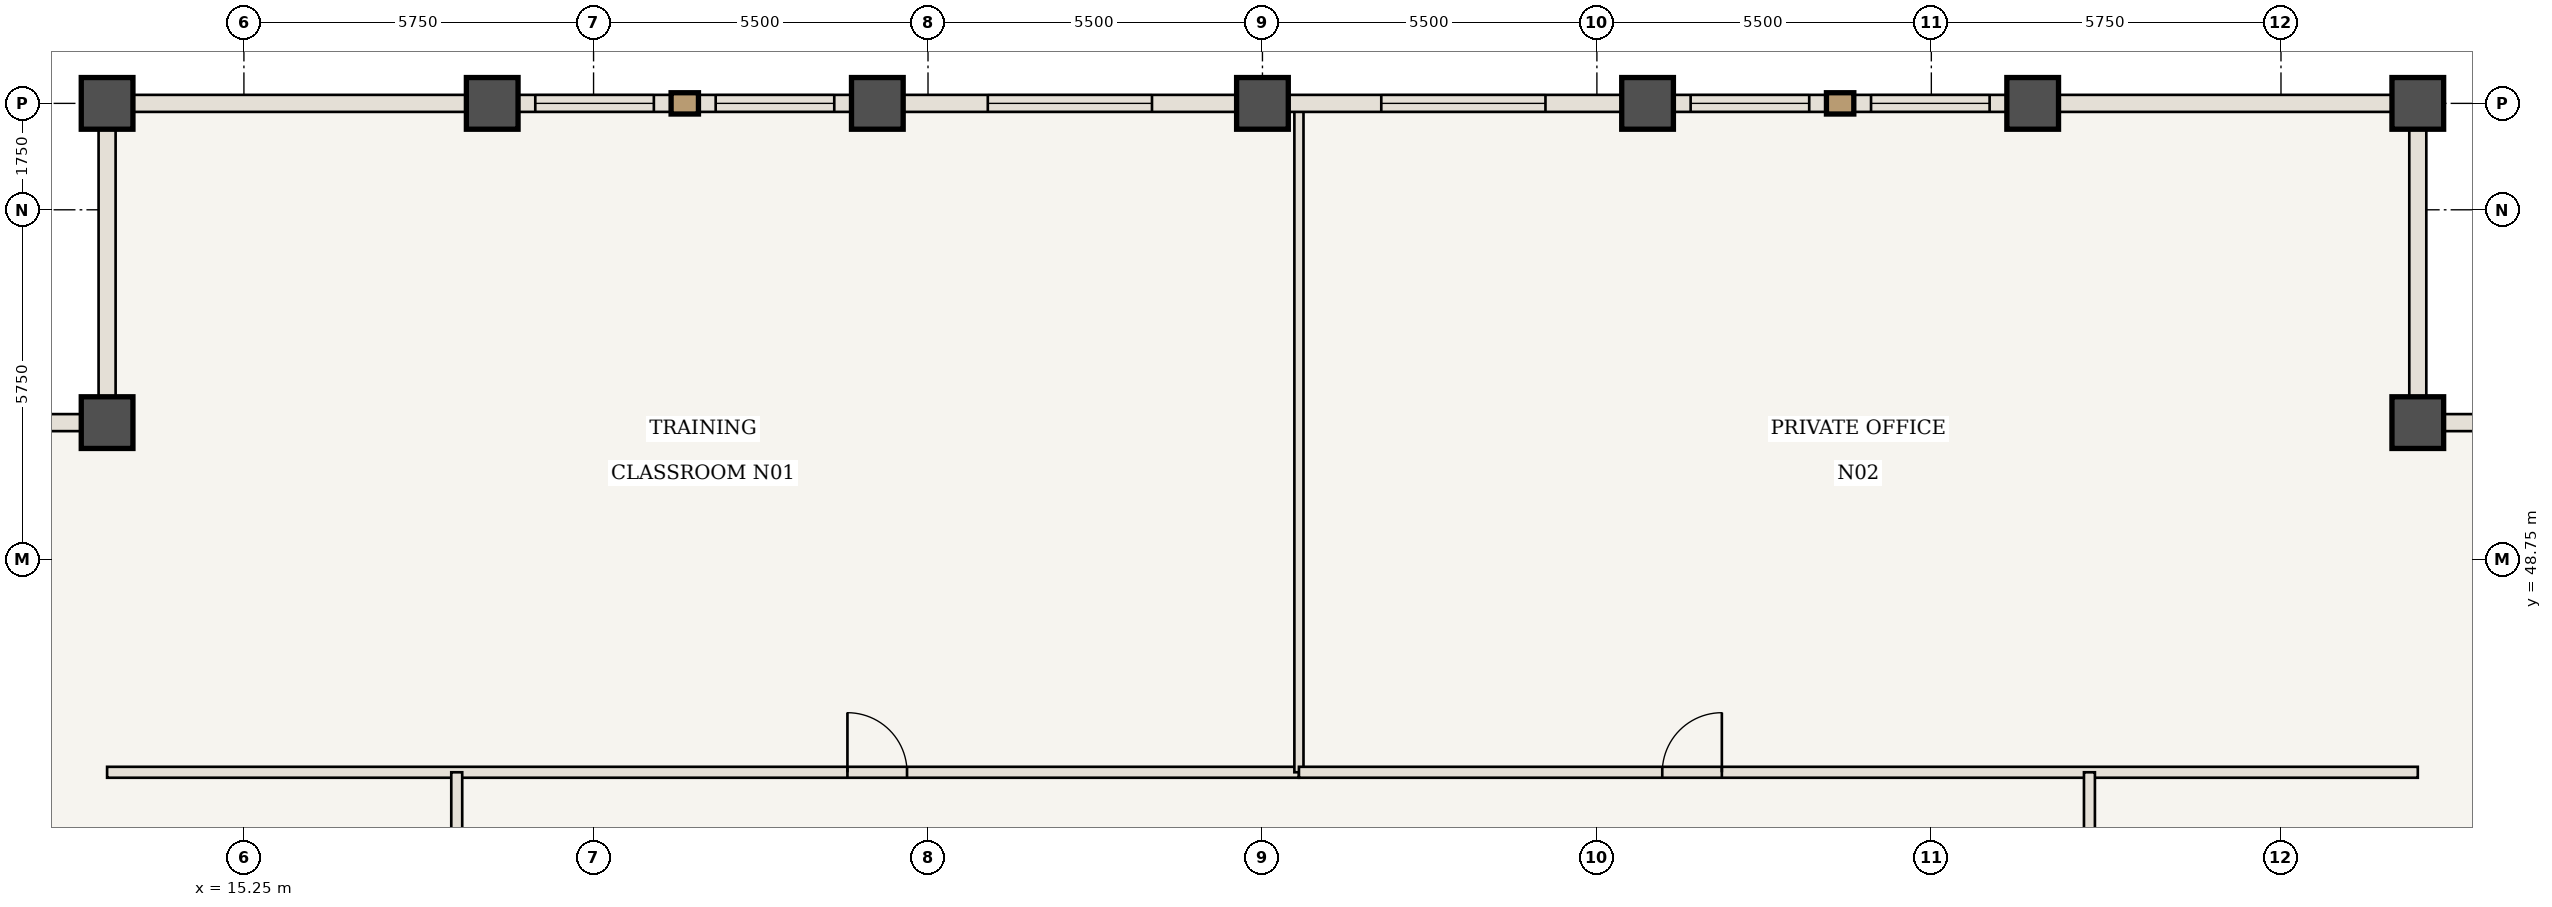
"""IFC4 building model, lengths in metres.
Left out: names, types, materials, properties, quantities, classifications, styles, units other than length and angle.
Written with IfcOpenShell. Run it as: python <this file> out.ifc"""

import sys

from ifc_helpers import new_model, si_unit, direction, frame, frame_2d, origin, origin_2d, place, context, subcontext, project, spatial, rectangle, extrude, element, fill, save


model = new_model("IFC4")
c1 = context("Model", 3, precision=1e-05, world=origin(), true_north=direction((0.0, 1.0)))
c2 = subcontext(c1, "Body", "Model", "MODEL_VIEW")
j1 = project(units=[si_unit("LENGTHUNIT", "METRE"), si_unit("PLANEANGLEUNIT", "RADIAN")], contexts=[c1])
p1 = place(None, origin())
s1 = spatial("IfcSite", under=j1, at=p1, CompositionType="ELEMENT")
p2 = place(p1, origin())
s2 = spatial("IfcBuilding", under=s1, at=p2, CompositionType="ELEMENT")
p3 = place(p2, frame((0.0, 0.0, 233.1)))
s3 = spatial("IfcBuildingStorey", under=s2, at=p3, CompositionType="ELEMENT", Elevation=233.1)
for number, where, z_axis, x_axis in (
    (1, (51.0, 51.0, 0.0), (0.0, 0.0, 1.0), (1.0, 0.0, 0.0)),
    (2, (51.0, 56.25, 0.0), (0.0, 0.0, 1.0), (1.0, 0.0, 0.0)),
    (3, (13.0, 56.25, 0.0), (0.0, 0.0, 1.0), (1.0, 0.0, 0.0)),
    (4, (13.0, 51.0, 0.0), (0.0, 0.0, 1.0), (1.0, 0.0, 0.0)),
    (5, (19.333, 56.25, 0.0), (0.0, 0.0, 1.0), (1.0, 0.0, 0.0)),
    (6, (25.667, 56.25, 0.0), (0.0, 0.0, 1.0), (1.0, 0.0, 0.0)),
    (7, (32.0, 56.25, 0.0), (0.0, 0.0, 1.0), (1.0, 0.0, 0.0)),
    (8, (38.333, 56.25, 0.0), (0.0, 0.0, 1.0), (1.0, 0.0, 0.0)),
    (9, (44.667, 56.25, 0.0), (0.0, 0.0, 1.0), (1.0, 0.0, 0.0)),
):
    element("IfcColumn", number, at=place(p3, frame(where, z_axis=z_axis, x_axis=x_axis)), inside=s3, PredefinedType="COLUMN", context=c2, shape_type="SweptSolid", body=[
        extrude(rectangle(XDim=0.85, YDim=0.85, at=origin_2d()), origin(), (0.0, 0.0, 1.0), 3.85),
    ])
p4 = place(p3, frame((13.0, 45.25, 0.0), z_axis=(0.0, 0.0, 1.0), x_axis=(1.0, 0.0, 0.0)))
e10 = element("IfcWall", 10, at=p4, inside=s3, PredefinedType="STANDARD", context=c2, shape_type="SweptSolid", body=[
    extrude(rectangle(XDim=19.6, YDim=0.18, at=frame_2d((9.8, 0.0))), origin(), (0.0, 0.0, 1.0), 3.685),
])
p5 = place(p4, frame((12.175, 0.0, 0.0)))
e11 = element("IfcOpeningElement", 11, at=p5, cuts=e10, PredefinedType="OPENING", context=c2, shape_type="SweptSolid", body=[
    extrude(rectangle(XDim=0.98, YDim=2.2, at=frame_2d((0.49, 1.1))), frame((0.0, 0.1, 0.0), z_axis=(0.0, -1.0, 0.0), x_axis=(1.0, 0.0, 0.0)), (0.0, 0.0, 1.0), 0.2),
])
p6 = place(p3, frame((32.6, 45.25, 0.0), z_axis=(0.0, 0.0, 1.0), x_axis=(0.0, 1.0, 0.0)))
e12 = element("IfcWall", 12, at=p6, inside=s3, PredefinedType="STANDARD", context=c2, shape_type="SweptSolid", body=[
    extrude(rectangle(XDim=10.94, YDim=0.15, at=frame_2d((5.47, 0.0))), origin(), (0.0, 0.0, 1.0), 3.685),
])
p7 = place(p3, frame((32.6, 45.25, 0.0), z_axis=(0.0, 0.0, 1.0), x_axis=(1.0, 0.0, 0.0)))
e13 = element("IfcWall", 13, at=p7, inside=s3, PredefinedType="STANDARD", context=c2, shape_type="SweptSolid", body=[
    extrude(rectangle(XDim=18.4, YDim=0.18, at=frame_2d((9.2, 0.0))), origin(), (0.0, 0.0, 1.0), 3.685),
])
p8 = place(p7, frame((5.975, 0.0, 0.0)))
e14 = element("IfcOpeningElement", 14, at=p8, cuts=e13, PredefinedType="OPENING", context=c2, shape_type="SweptSolid", body=[
    extrude(rectangle(XDim=0.98, YDim=2.2, at=frame_2d((0.49, 1.1))), frame((0.0, 0.1, 0.0), z_axis=(0.0, -1.0, 0.0), x_axis=(1.0, 0.0, 0.0)), (0.0, 0.0, 1.0), 0.2),
])
p9 = place(p3, frame((18.75, 18.75, 0.0), z_axis=(0.0, 0.0, 1.0), x_axis=(0.0, 1.0, 0.0)))
e15 = element("IfcWall", 15, at=p9, inside=s3, PredefinedType="STANDARD", context=c2, shape_type="SweptSolid", body=[
    extrude(rectangle(XDim=26.5, YDim=0.18, at=frame_2d((13.25, 0.0))), origin(), (0.0, 0.0, 1.0), 3.685),
])
p10 = place(p9, frame((14.2, 0.0, 0.0)))
e16 = element("IfcOpeningElement", 16, at=p10, cuts=e15, PredefinedType="OPENING", context=c2, shape_type="SweptSolid", body=[
    extrude(rectangle(XDim=0.98, YDim=2.2, at=frame_2d((0.49, 1.1))), frame((0.0, 0.1, 0.0), z_axis=(0.0, -1.0, 0.0), x_axis=(1.0, 0.0, 0.0)), (0.0, 0.0, 1.0), 0.2),
])
p11 = place(p3, frame((45.6, 32.7, 0.0), z_axis=(0.0, 0.0, 1.0), x_axis=(0.0, 1.0, 0.0)))
e17 = element("IfcWall", 17, at=p11, inside=s3, PredefinedType="STANDARD", context=c2, shape_type="SweptSolid", body=[
    extrude(rectangle(XDim=12.55, YDim=0.18, at=frame_2d((6.275, 0.0))), origin(), (0.0, 0.0, 1.0), 3.685),
])
p12 = place(p11, frame((5.775, 0.0, 0.0)))
e18 = element("IfcOpeningElement", 18, at=p12, cuts=e17, PredefinedType="OPENING", context=c2, shape_type="SweptSolid", body=[
    extrude(rectangle(XDim=0.98, YDim=2.2, at=frame_2d((0.49, 1.1))), frame((0.0, 0.1, 0.0), z_axis=(0.0, -1.0, 0.0), x_axis=(1.0, 0.0, 0.0)), (0.0, 0.0, 1.0), 0.2),
])
p13 = place(p3, frame((13.0, 56.25, 0.0), z_axis=(0.0, 0.0, 1.0), x_axis=(1.0, 0.0, 0.0)))
e19 = element("IfcWall", 19, at=p13, inside=s3, PredefinedType="USERDEFINED", context=c2, shape_type="SweptSolid", body=[
    extrude(rectangle(XDim=6.333, YDim=0.28, at=frame_2d((3.167, 0.0))), origin(), (0.0, 0.0, 1.0), 2.985),
])
p14 = place(p3, frame((19.333, 56.25, 0.0), z_axis=(0.0, 0.0, 1.0), x_axis=(1.0, 0.0, 0.0)))
e20 = element("IfcWall", 20, at=p14, inside=s3, PredefinedType="USERDEFINED", context=c2, shape_type="SweptSolid", body=[
    extrude(rectangle(XDim=6.333, YDim=0.28, at=frame_2d((3.167, 0.0))), origin(), (0.0, 0.0, 1.0), 2.985),
])
p15 = place(p14, frame((0.708, 0.0, 0.85)))
e21 = element("IfcOpeningElement", 21, at=p15, cuts=e20, PredefinedType="OPENING", context=c2, shape_type="SweptSolid", body=[
    extrude(rectangle(XDim=1.95, YDim=1.935, at=frame_2d((0.975, 0.968))), frame((0.0, 0.15, 0.0), z_axis=(0.0, -1.0, 0.0), x_axis=(1.0, 0.0, 0.0)), (0.0, 0.0, 1.0), 0.3),
])
p16 = place(p14, frame((3.675, 0.0, 0.85)))
e22 = element("IfcOpeningElement", 22, at=p16, cuts=e20, PredefinedType="OPENING", context=c2, shape_type="SweptSolid", body=[
    extrude(rectangle(XDim=1.95, YDim=1.935, at=frame_2d((0.975, 0.968))), frame((0.0, 0.15, 0.0), z_axis=(0.0, -1.0, 0.0), x_axis=(1.0, 0.0, 0.0)), (0.0, 0.0, 1.0), 0.3),
])
p17 = place(p3, frame((25.667, 56.25, 0.0), z_axis=(0.0, 0.0, 1.0), x_axis=(1.0, 0.0, 0.0)))
e23 = element("IfcWall", 23, at=p17, inside=s3, PredefinedType="USERDEFINED", context=c2, shape_type="SweptSolid", body=[
    extrude(rectangle(XDim=6.333, YDim=0.28, at=frame_2d((3.167, 0.0))), origin(), (0.0, 0.0, 1.0), 2.985),
])
p18 = place(p17, frame((1.817, 0.0, 0.85)))
e24 = element("IfcOpeningElement", 24, at=p18, cuts=e23, PredefinedType="OPENING", context=c2, shape_type="SweptSolid", body=[
    extrude(rectangle(XDim=2.7, YDim=1.935, at=frame_2d((1.35, 0.968))), frame((0.0, 0.15, 0.0), z_axis=(0.0, -1.0, 0.0), x_axis=(1.0, 0.0, 0.0)), (0.0, 0.0, 1.0), 0.3),
])
p19 = place(p3, frame((32.0, 56.25, 0.0), z_axis=(0.0, 0.0, 1.0), x_axis=(1.0, 0.0, 0.0)))
e25 = element("IfcWall", 25, at=p19, inside=s3, PredefinedType="USERDEFINED", context=c2, shape_type="SweptSolid", body=[
    extrude(rectangle(XDim=6.333, YDim=0.28, at=frame_2d((3.167, 0.0))), origin(), (0.0, 0.0, 1.0), 2.985),
])
p20 = place(p19, frame((1.954, 0.0, 0.85)))
e26 = element("IfcOpeningElement", 26, at=p20, cuts=e25, PredefinedType="OPENING", context=c2, shape_type="SweptSolid", body=[
    extrude(rectangle(XDim=2.7, YDim=1.935, at=frame_2d((1.35, 0.968))), frame((0.0, 0.15, 0.0), z_axis=(0.0, -1.0, 0.0), x_axis=(1.0, 0.0, 0.0)), (0.0, 0.0, 1.0), 0.3),
])
p21 = place(p3, frame((38.333, 56.25, 0.0), z_axis=(0.0, 0.0, 1.0), x_axis=(1.0, 0.0, 0.0)))
e27 = element("IfcWall", 27, at=p21, inside=s3, PredefinedType="USERDEFINED", context=c2, shape_type="SweptSolid", body=[
    extrude(rectangle(XDim=6.333, YDim=0.28, at=frame_2d((3.167, 0.0))), origin(), (0.0, 0.0, 1.0), 2.985),
])
p22 = place(p21, frame((0.708, 0.0, 0.85)))
e28 = element("IfcOpeningElement", 28, at=p22, cuts=e27, PredefinedType="OPENING", context=c2, shape_type="SweptSolid", body=[
    extrude(rectangle(XDim=1.95, YDim=1.935, at=frame_2d((0.975, 0.968))), frame((0.0, 0.15, 0.0), z_axis=(0.0, -1.0, 0.0), x_axis=(1.0, 0.0, 0.0)), (0.0, 0.0, 1.0), 0.3),
])
p23 = place(p21, frame((3.675, 0.0, 0.85)))
e29 = element("IfcOpeningElement", 29, at=p23, cuts=e27, PredefinedType="OPENING", context=c2, shape_type="SweptSolid", body=[
    extrude(rectangle(XDim=1.95, YDim=1.935, at=frame_2d((0.975, 0.968))), frame((0.0, 0.15, 0.0), z_axis=(0.0, -1.0, 0.0), x_axis=(1.0, 0.0, 0.0)), (0.0, 0.0, 1.0), 0.3),
])
p24 = place(p3, frame((44.667, 56.25, 0.0), z_axis=(0.0, 0.0, 1.0), x_axis=(1.0, 0.0, 0.0)))
e30 = element("IfcWall", 30, at=p24, inside=s3, PredefinedType="USERDEFINED", context=c2, shape_type="SweptSolid", body=[
    extrude(rectangle(XDim=6.333, YDim=0.28, at=frame_2d((3.167, 0.0))), origin(), (0.0, 0.0, 1.0), 2.985),
])
for number, where, z_axis, x_axis in (
    (31, (51.0, 51.0, 0.0), (0.0, 0.0, 1.0), (1.0, 0.0, 0.0)),
    (32, (51.0, 56.25, 0.0), (0.0, 0.0, 1.0), (0.0, -1.0, 0.0)),
    (33, (13.0, 51.0, 0.0), (0.0, 0.0, 1.0), (0.0, 1.0, 0.0)),
    (34, (7.75, 51.0, 0.0), (0.0, 0.0, 1.0), (1.0, 0.0, 0.0)),
):
    element("IfcWall", number, at=place(p3, frame(where, z_axis=z_axis, x_axis=x_axis)), inside=s3, PredefinedType="USERDEFINED", context=c2, shape_type="SweptSolid", body=[
        extrude(rectangle(XDim=5.25, YDim=0.28, at=frame_2d((2.625, 0.0))), origin(), (0.0, 0.0, 1.0), 2.985),
    ])
p25 = place(p5, origin())
e35 = element("IfcDoor", 35, at=p25, inside=s3, OperationType="SINGLE_SWING_LEFT", PredefinedType="DOOR", context=c2, shape_type="SweptSolid", body=[
    extrude(rectangle(XDim=0.98, YDim=2.2, at=frame_2d((0.49, 1.1))), frame((0.0, 0.025, 0.0), z_axis=(0.0, -1.0, 0.0), x_axis=(1.0, 0.0, 0.0)), (0.0, 0.0, 1.0), 0.05),
])
fill(e11, e35)
p26 = place(p8, origin())
e36 = element("IfcDoor", 36, at=p26, inside=s3, OperationType="SINGLE_SWING_RIGHT", PredefinedType="DOOR", context=c2, shape_type="SweptSolid", body=[
    extrude(rectangle(XDim=0.98, YDim=2.2, at=frame_2d((0.49, 1.1))), frame((0.0, 0.025, 0.0), z_axis=(0.0, -1.0, 0.0), x_axis=(1.0, 0.0, 0.0)), (0.0, 0.0, 1.0), 0.05),
])
fill(e14, e36)
p27 = place(p15, origin())
e37 = element("IfcWindow", 37, at=p27, inside=s3, PartitioningType="SINGLE_PANEL", PredefinedType="WINDOW", context=c2, shape_type="SweptSolid", body=[
    extrude(rectangle(XDim=1.95, YDim=1.935, at=frame_2d((0.975, 0.968))), frame((0.0, 0.03, 0.0), z_axis=(0.0, -1.0, 0.0), x_axis=(1.0, 0.0, 0.0)), (0.0, 0.0, 1.0), 0.06),
])
fill(e21, e37)
p28 = place(p16, origin())
e38 = element("IfcWindow", 38, at=p28, inside=s3, PartitioningType="SINGLE_PANEL", PredefinedType="WINDOW", context=c2, shape_type="SweptSolid", body=[
    extrude(rectangle(XDim=1.95, YDim=1.935, at=frame_2d((0.975, 0.968))), frame((0.0, 0.03, 0.0), z_axis=(0.0, -1.0, 0.0), x_axis=(1.0, 0.0, 0.0)), (0.0, 0.0, 1.0), 0.06),
])
fill(e22, e38)
p29 = place(p18, origin())
e39 = element("IfcWindow", 39, at=p29, inside=s3, PartitioningType="SINGLE_PANEL", PredefinedType="WINDOW", context=c2, shape_type="SweptSolid", body=[
    extrude(rectangle(XDim=2.7, YDim=1.935, at=frame_2d((1.35, 0.968))), frame((0.0, 0.03, 0.0), z_axis=(0.0, -1.0, 0.0), x_axis=(1.0, 0.0, 0.0)), (0.0, 0.0, 1.0), 0.06),
])
fill(e24, e39)
p30 = place(p20, origin())
e40 = element("IfcWindow", 40, at=p30, inside=s3, PartitioningType="SINGLE_PANEL", PredefinedType="WINDOW", context=c2, shape_type="SweptSolid", body=[
    extrude(rectangle(XDim=2.7, YDim=1.935, at=frame_2d((1.35, 0.968))), frame((0.0, 0.03, 0.0), z_axis=(0.0, -1.0, 0.0), x_axis=(1.0, 0.0, 0.0)), (0.0, 0.0, 1.0), 0.06),
])
fill(e26, e40)
p31 = place(p22, origin())
e41 = element("IfcWindow", 41, at=p31, inside=s3, PartitioningType="SINGLE_PANEL", PredefinedType="WINDOW", context=c2, shape_type="SweptSolid", body=[
    extrude(rectangle(XDim=1.95, YDim=1.935, at=frame_2d((0.975, 0.968))), frame((0.0, 0.03, 0.0), z_axis=(0.0, -1.0, 0.0), x_axis=(1.0, 0.0, 0.0)), (0.0, 0.0, 1.0), 0.06),
])
fill(e28, e41)
p32 = place(p23, origin())
e42 = element("IfcWindow", 42, at=p32, inside=s3, PartitioningType="SINGLE_PANEL", PredefinedType="WINDOW", context=c2, shape_type="SweptSolid", body=[
    extrude(rectangle(XDim=1.95, YDim=1.935, at=frame_2d((0.975, 0.968))), frame((0.0, 0.03, 0.0), z_axis=(0.0, -1.0, 0.0), x_axis=(1.0, 0.0, 0.0)), (0.0, 0.0, 1.0), 0.06),
])
fill(e29, e42)
save(model, sys.argv[1])
